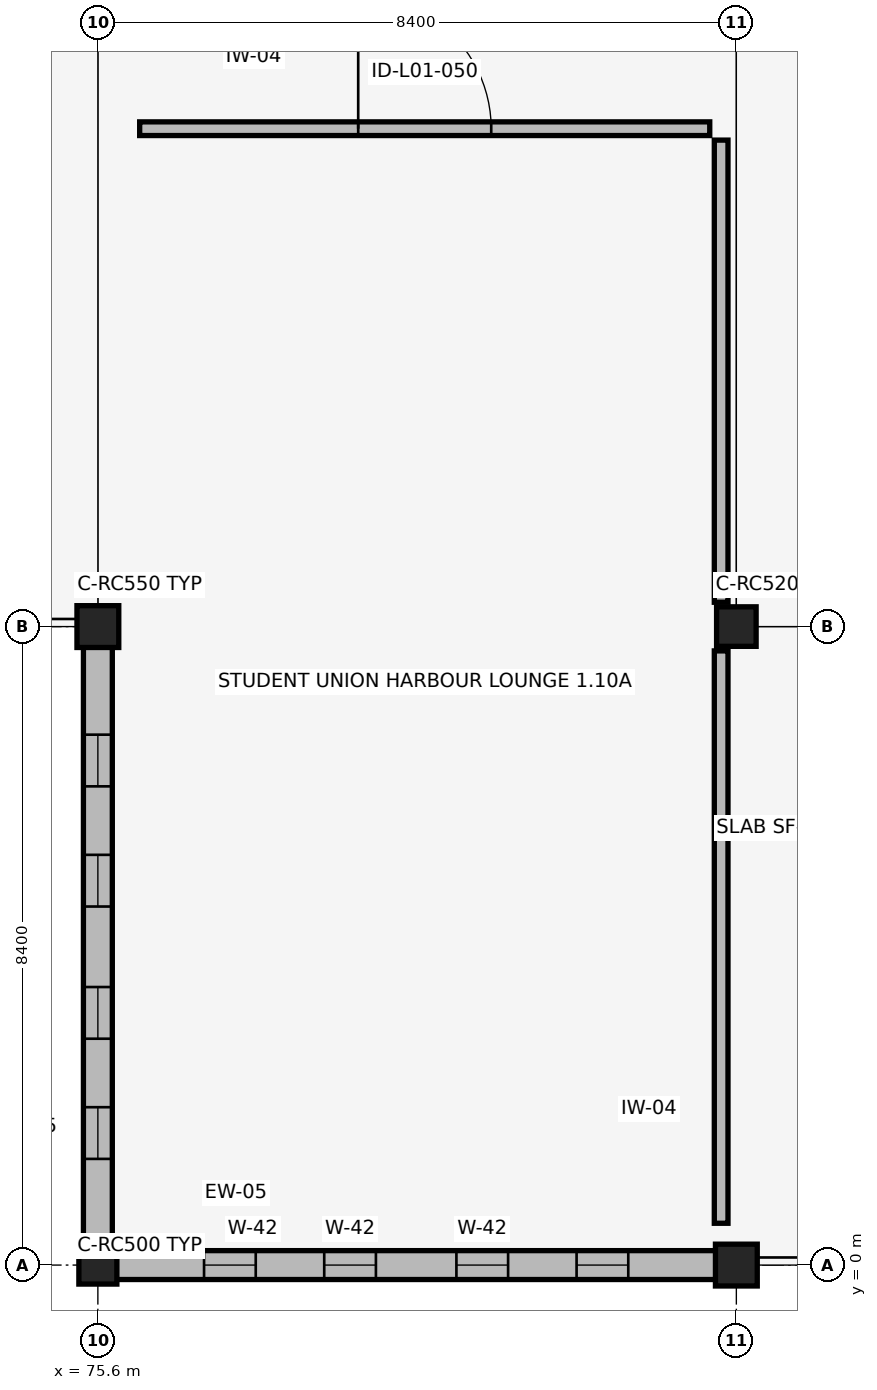
"""IFC4 building model, lengths in metres.
Left out: names, types, materials, properties, quantities, classifications, styles, units other than length and angle.
Written with IfcOpenShell. Run it as: python <this file> out.ifc"""

import sys

from ifc_helpers import new_model, si_unit, direction, frame, frame_2d, origin, origin_2d, place, context, subcontext, project, spatial, rectangle, extrude, element, fill, save


model = new_model("IFC4")
c1 = context("Model", 3, precision=1e-05, world=origin(), true_north=direction((0.0, 1.0)))
c2 = subcontext(c1, "Body", "Model", "MODEL_VIEW")
j1 = project(units=[si_unit("LENGTHUNIT", "METRE"), si_unit("PLANEANGLEUNIT", "RADIAN")], contexts=[c1])
p1 = place(None, origin())
s1 = spatial("IfcSite", under=j1, at=p1, CompositionType="ELEMENT")
p2 = place(p1, origin())
s2 = spatial("IfcBuilding", under=s1, at=p2, CompositionType="ELEMENT")
p3 = place(p2, frame((0.0, 0.0, 5.44)))
s3 = spatial("IfcBuildingStorey", under=s2, at=p3, CompositionType="ELEMENT", Elevation=5.44)
p4 = place(p3, frame((75.6, 0.0, 0.0), z_axis=(0.0, 0.0, 1.0), x_axis=(1.0, 0.0, 0.0)))
e1 = element("IfcColumn", 1, at=p4, inside=s3, PredefinedType="COLUMN", context=c2, shape_type="SweptSolid", body=[
    extrude(rectangle(XDim=0.5, YDim=0.5, at=origin_2d()), origin(), (0.0, 0.0, 1.0), 4.12),
])
for number, where, z_axis, x_axis in (
    (2, (75.6, 8.4, 0.0), (0.0, 0.0, 1.0), (1.0, 0.0, 0.0)),
    (3, (84.0, 0.0, 0.0), (0.0, 0.0, 1.0), (1.0, 0.0, 0.0)),
):
    element("IfcColumn", number, at=place(p3, frame(where, z_axis=z_axis, x_axis=x_axis)), inside=s3, PredefinedType="COLUMN", context=c2, shape_type="SweptSolid", body=[
        extrude(rectangle(XDim=0.55, YDim=0.55, at=origin_2d()), origin(), (0.0, 0.0, 1.0), 4.12),
    ])
p5 = place(p3, frame((84.0, 8.4, 0.0), z_axis=(0.0, 0.0, 1.0), x_axis=(1.0, 0.0, 0.0)))
e4 = element("IfcColumn", 4, at=p5, inside=s3, PredefinedType="COLUMN", context=c2, shape_type="SweptSolid", body=[
    extrude(rectangle(XDim=0.52, YDim=0.52, at=origin_2d()), origin(), (0.0, 0.0, 1.0), 4.12),
])
p6 = place(p3, frame((75.835, 0.0, 0.0), z_axis=(0.0, 0.0, 1.0), x_axis=(1.0, 0.0, 0.0)))
e5 = element("IfcWall", 5, at=p6, inside=s3, PredefinedType="SOLIDWALL", context=c2, shape_type="SweptSolid", body=[
    extrude(rectangle(XDim=7.905, YDim=0.38, at=frame_2d((3.953, 0.0))), origin(), (0.0, 0.0, 1.0), 3.38),
])
p7 = place(p6, frame((1.162, 0.0, 0.7)))
e6 = element("IfcOpeningElement", 6, at=p7, cuts=e5, PredefinedType="OPENING", context=c2, shape_type="SweptSolid", body=[
    extrude(rectangle(XDim=0.68, YDim=2.3, at=frame_2d((0.34, 1.15))), frame((0.0, 0.2, 0.0), z_axis=(0.0, -1.0, 0.0), x_axis=(1.0, 0.0, 0.0)), (0.0, 0.0, 1.0), 0.4),
])
p8 = place(p6, frame((2.743, 0.0, 0.7)))
e7 = element("IfcOpeningElement", 7, at=p8, cuts=e5, PredefinedType="OPENING", context=c2, shape_type="SweptSolid", body=[
    extrude(rectangle(XDim=0.68, YDim=2.3, at=frame_2d((0.34, 1.15))), frame((0.0, 0.2, 0.0), z_axis=(0.0, -1.0, 0.0), x_axis=(1.0, 0.0, 0.0)), (0.0, 0.0, 1.0), 0.4),
])
p9 = place(p6, frame((4.482, 0.0, 0.7)))
e8 = element("IfcOpeningElement", 8, at=p9, cuts=e5, PredefinedType="OPENING", context=c2, shape_type="SweptSolid", body=[
    extrude(rectangle(XDim=0.68, YDim=2.3, at=frame_2d((0.34, 1.15))), frame((0.0, 0.2, 0.0), z_axis=(0.0, -1.0, 0.0), x_axis=(1.0, 0.0, 0.0)), (0.0, 0.0, 1.0), 0.4),
])
p10 = place(p6, frame((6.063, 0.0, 0.7)))
e9 = element("IfcOpeningElement", 9, at=p10, cuts=e5, PredefinedType="OPENING", context=c2, shape_type="SweptSolid", body=[
    extrude(rectangle(XDim=0.68, YDim=2.3, at=frame_2d((0.34, 1.15))), frame((0.0, 0.2, 0.0), z_axis=(0.0, -1.0, 0.0), x_axis=(1.0, 0.0, 0.0)), (0.0, 0.0, 1.0), 0.4),
])
p11 = place(p3, frame((75.6, 0.235, 0.0), z_axis=(0.0, 0.0, 1.0), x_axis=(0.0, 1.0, 0.0)))
e10 = element("IfcWall", 10, at=p11, inside=s3, PredefinedType="SOLIDWALL", context=c2, shape_type="SweptSolid", body=[
    extrude(rectangle(XDim=7.905, YDim=0.38, at=frame_2d((3.952, 0.0))), origin(), (0.0, 0.0, 1.0), 3.81),
])
p12 = place(p11, frame((1.162, 0.0, 0.75)))
e11 = element("IfcOpeningElement", 11, at=p12, cuts=e10, PredefinedType="OPENING", context=c2, shape_type="SweptSolid", body=[
    extrude(rectangle(XDim=0.68, YDim=2.3, at=frame_2d((0.34, 1.15))), frame((0.0, 0.2, 0.0), z_axis=(0.0, -1.0, 0.0), x_axis=(1.0, 0.0, 0.0)), (0.0, 0.0, 1.0), 0.4),
])
p13 = place(p11, frame((2.743, 0.0, 0.75)))
e12 = element("IfcOpeningElement", 12, at=p13, cuts=e10, PredefinedType="OPENING", context=c2, shape_type="SweptSolid", body=[
    extrude(rectangle(XDim=0.68, YDim=2.3, at=frame_2d((0.34, 1.15))), frame((0.0, 0.2, 0.0), z_axis=(0.0, -1.0, 0.0), x_axis=(1.0, 0.0, 0.0)), (0.0, 0.0, 1.0), 0.4),
])
p14 = place(p11, frame((4.482, 0.0, 0.75)))
e13 = element("IfcOpeningElement", 13, at=p14, cuts=e10, PredefinedType="OPENING", context=c2, shape_type="SweptSolid", body=[
    extrude(rectangle(XDim=0.68, YDim=2.3, at=frame_2d((0.34, 1.15))), frame((0.0, 0.2, 0.0), z_axis=(0.0, -1.0, 0.0), x_axis=(1.0, 0.0, 0.0)), (0.0, 0.0, 1.0), 0.4),
])
p15 = place(p11, frame((6.063, 0.0, 0.75)))
e14 = element("IfcOpeningElement", 14, at=p15, cuts=e10, PredefinedType="OPENING", context=c2, shape_type="SweptSolid", body=[
    extrude(rectangle(XDim=0.68, YDim=2.3, at=frame_2d((0.34, 1.15))), frame((0.0, 0.2, 0.0), z_axis=(0.0, -1.0, 0.0), x_axis=(1.0, 0.0, 0.0)), (0.0, 0.0, 1.0), 0.4),
])
p16 = place(p3, frame((76.15, 14.95, 0.0), z_axis=(0.0, 0.0, 1.0), x_axis=(1.0, 0.0, 0.0)))
e15 = element("IfcWall", 15, at=p16, inside=s3, PredefinedType="PARTITIONING", context=c2, shape_type="SweptSolid", body=[
    extrude(rectangle(XDim=7.5, YDim=0.18, at=frame_2d((3.75, 0.0))), origin(), (0.0, 0.0, 1.0), 4.12),
])
p17 = place(p16, frame((2.875, 0.0, 0.0)))
e16 = element("IfcOpeningElement", 16, at=p17, cuts=e15, PredefinedType="OPENING", context=c2, shape_type="SweptSolid", body=[
    extrude(rectangle(XDim=1.75, YDim=2.3, at=frame_2d((0.875, 1.15))), frame((0.0, 0.1, 0.0), z_axis=(0.0, -1.0, 0.0), x_axis=(1.0, 0.0, 0.0)), (0.0, 0.0, 1.0), 0.2),
])
p18 = place(p3, frame((83.8, 0.55, 0.0), z_axis=(0.0, 0.0, 1.0), x_axis=(0.0, 1.0, 0.0)))
e17 = element("IfcWall", 17, at=p18, inside=s3, PredefinedType="PARTITIONING", context=c2, shape_type="SweptSolid", body=[
    extrude(rectangle(XDim=7.53, YDim=0.18, at=frame_2d((3.765, 0.0))), origin(), (0.0, 0.0, 1.0), 3.47),
])
p19 = place(p3, frame((83.8, 8.72, 0.0), z_axis=(0.0, 0.0, 1.0), x_axis=(0.0, 1.0, 0.0)))
e18 = element("IfcWall", 18, at=p19, inside=s3, PredefinedType="PARTITIONING", context=c2, shape_type="SweptSolid", body=[
    extrude(rectangle(XDim=6.08, YDim=0.18, at=frame_2d((3.04, 0.0))), origin(), (0.0, 0.0, 1.0), 3.47),
])
p20 = place(p7, origin())
e19 = element("IfcWindow", 19, at=p20, inside=s3, PartitioningType="DOUBLE_PANEL_VERTICAL", PredefinedType="WINDOW", context=c2, shape_type="SweptSolid", body=[
    extrude(rectangle(XDim=0.68, YDim=2.3, at=frame_2d((0.34, 1.15))), frame((0.0, 0.03, 0.0), z_axis=(0.0, -1.0, 0.0), x_axis=(1.0, 0.0, 0.0)), (0.0, 0.0, 1.0), 0.06),
])
fill(e6, e19)
p21 = place(p8, origin())
e20 = element("IfcWindow", 20, at=p21, inside=s3, PartitioningType="DOUBLE_PANEL_VERTICAL", PredefinedType="WINDOW", context=c2, shape_type="SweptSolid", body=[
    extrude(rectangle(XDim=0.68, YDim=2.3, at=frame_2d((0.34, 1.15))), frame((0.0, 0.03, 0.0), z_axis=(0.0, -1.0, 0.0), x_axis=(1.0, 0.0, 0.0)), (0.0, 0.0, 1.0), 0.06),
])
fill(e7, e20)
p22 = place(p9, origin())
e21 = element("IfcWindow", 21, at=p22, inside=s3, PartitioningType="DOUBLE_PANEL_VERTICAL", PredefinedType="WINDOW", context=c2, shape_type="SweptSolid", body=[
    extrude(rectangle(XDim=0.68, YDim=2.3, at=frame_2d((0.34, 1.15))), frame((0.0, 0.03, 0.0), z_axis=(0.0, -1.0, 0.0), x_axis=(1.0, 0.0, 0.0)), (0.0, 0.0, 1.0), 0.06),
])
fill(e8, e21)
p23 = place(p10, origin())
e22 = element("IfcWindow", 22, at=p23, inside=s3, PartitioningType="DOUBLE_PANEL_VERTICAL", PredefinedType="WINDOW", context=c2, shape_type="SweptSolid", body=[
    extrude(rectangle(XDim=0.68, YDim=2.3, at=frame_2d((0.34, 1.15))), frame((0.0, 0.03, 0.0), z_axis=(0.0, -1.0, 0.0), x_axis=(1.0, 0.0, 0.0)), (0.0, 0.0, 1.0), 0.06),
])
fill(e9, e22)
p24 = place(p12, origin())
e23 = element("IfcWindow", 23, at=p24, inside=s3, PartitioningType="DOUBLE_PANEL_VERTICAL", PredefinedType="WINDOW", context=c2, shape_type="SweptSolid", body=[
    extrude(rectangle(XDim=0.68, YDim=2.3, at=frame_2d((0.34, 1.15))), frame((0.0, 0.03, 0.0), z_axis=(0.0, -1.0, 0.0), x_axis=(1.0, 0.0, 0.0)), (0.0, 0.0, 1.0), 0.06),
])
fill(e11, e23)
p25 = place(p13, origin())
e24 = element("IfcWindow", 24, at=p25, inside=s3, PartitioningType="DOUBLE_PANEL_VERTICAL", PredefinedType="WINDOW", context=c2, shape_type="SweptSolid", body=[
    extrude(rectangle(XDim=0.68, YDim=2.3, at=frame_2d((0.34, 1.15))), frame((0.0, 0.03, 0.0), z_axis=(0.0, -1.0, 0.0), x_axis=(1.0, 0.0, 0.0)), (0.0, 0.0, 1.0), 0.06),
])
fill(e12, e24)
p26 = place(p14, origin())
e25 = element("IfcWindow", 25, at=p26, inside=s3, PartitioningType="DOUBLE_PANEL_VERTICAL", PredefinedType="WINDOW", context=c2, shape_type="SweptSolid", body=[
    extrude(rectangle(XDim=0.68, YDim=2.3, at=frame_2d((0.34, 1.15))), frame((0.0, 0.03, 0.0), z_axis=(0.0, -1.0, 0.0), x_axis=(1.0, 0.0, 0.0)), (0.0, 0.0, 1.0), 0.06),
])
fill(e13, e25)
p27 = place(p15, origin())
e26 = element("IfcWindow", 26, at=p27, inside=s3, PartitioningType="DOUBLE_PANEL_VERTICAL", PredefinedType="WINDOW", context=c2, shape_type="SweptSolid", body=[
    extrude(rectangle(XDim=0.68, YDim=2.3, at=frame_2d((0.34, 1.15))), frame((0.0, 0.03, 0.0), z_axis=(0.0, -1.0, 0.0), x_axis=(1.0, 0.0, 0.0)), (0.0, 0.0, 1.0), 0.06),
])
fill(e14, e26)
p28 = place(p17, origin())
e27 = element("IfcDoor", 27, at=p28, inside=s3, OperationType="DOUBLE_DOOR_SINGLE_SWING", PredefinedType="DOOR", context=c2, shape_type="SweptSolid", body=[
    extrude(rectangle(XDim=1.75, YDim=2.3, at=frame_2d((0.875, 1.15))), frame((0.0, 0.025, 0.0), z_axis=(0.0, -1.0, 0.0), x_axis=(1.0, 0.0, 0.0)), (0.0, 0.0, 1.0), 0.05),
])
fill(e16, e27)
save(model, sys.argv[1])
